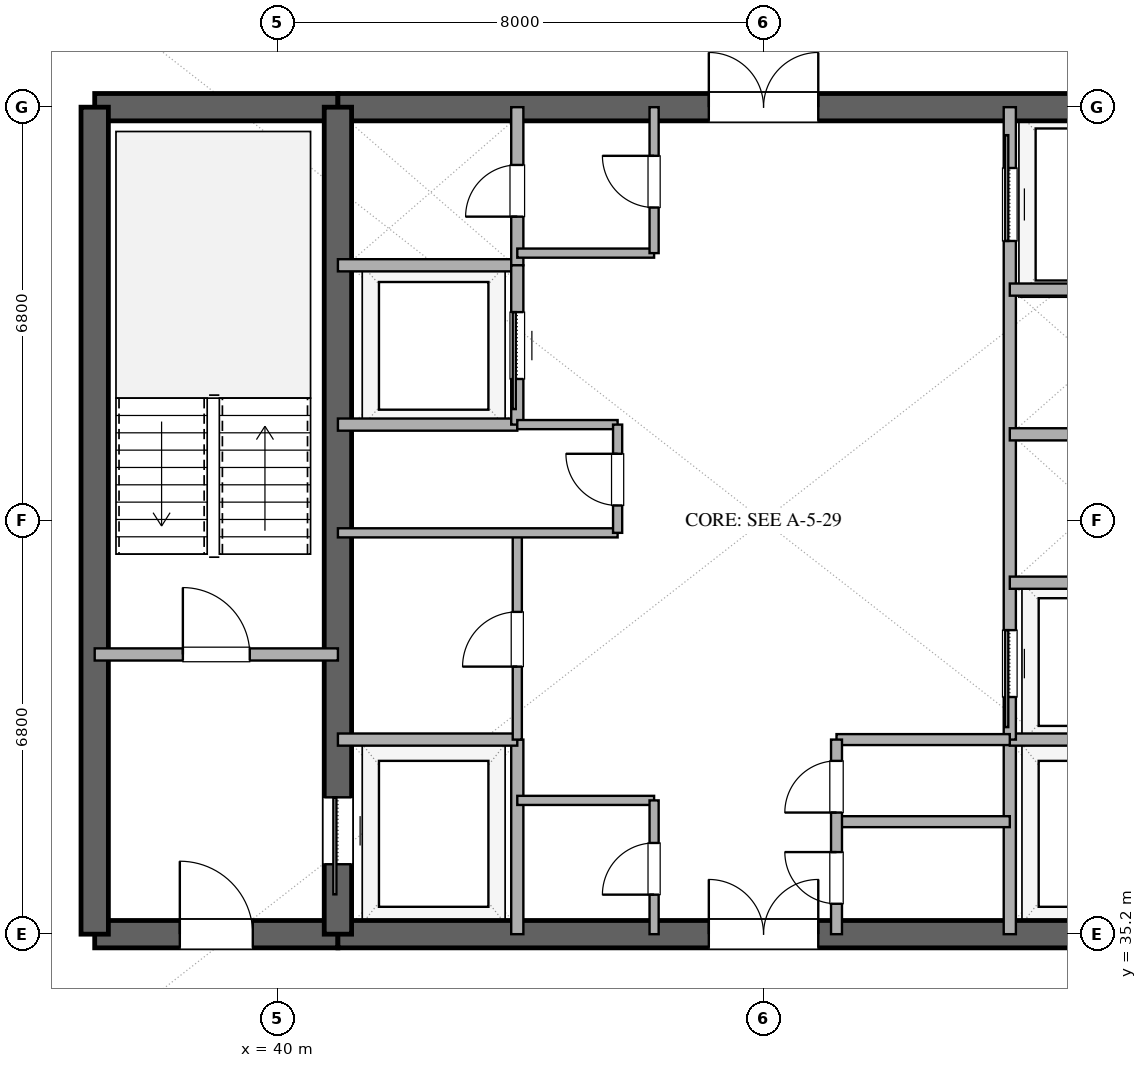
"""IFC4 building model, lengths in metres.
Left out: names, types, materials, properties, quantities, classifications, styles, units other than length and angle.
Written with IfcOpenShell. Run it as: python <this file> out.ifc"""

import sys

from ifc_helpers import new_model, si_unit, direction, frame, frame_2d, origin, place, context, subcontext, project, spatial, rectangle, extrude, element, fill, save


model = new_model("IFC4")
c1 = context("Model", 3, precision=1e-05, world=origin(), true_north=direction((0.0, 1.0)))
c2 = subcontext(c1, "Body", "Model", "MODEL_VIEW")
j1 = project(units=[si_unit("LENGTHUNIT", "METRE"), si_unit("PLANEANGLEUNIT", "RADIAN")], contexts=[c1])
p1 = place(None, origin())
s1 = spatial("IfcSite", under=j1, at=p1, CompositionType="ELEMENT")
p2 = place(p1, origin())
s2 = spatial("IfcBuilding", under=s1, at=p2, CompositionType="ELEMENT")
p3 = place(p2, frame((0.0, 0.0, 193.8)))
s3 = spatial("IfcBuildingStorey", under=s2, at=p3, CompositionType="ELEMENT", Elevation=193.8)
p4 = place(p3, frame((37.0, 35.2, 0.0), z_axis=(0.0, 0.0, 1.0), x_axis=(1.0, 0.0, 0.0)))
e1 = element("IfcWall", 1, at=p4, inside=s3, PredefinedType="SHEAR", context=c2, shape_type="SweptSolid", body=[
    extrude(rectangle(XDim=4.0, YDim=0.45, at=frame_2d((2.0, 0.0))), origin(), (0.0, 0.0, 1.0), 3.38),
])
p5 = place(p4, frame((1.4, 0.0, 0.0)))
e2 = element("IfcOpeningElement", 2, at=p5, cuts=e1, PredefinedType="OPENING", context=c2, shape_type="SweptSolid", body=[
    extrude(rectangle(XDim=1.2, YDim=2.15, at=frame_2d((0.6, 1.075))), frame((0.0, 0.235, 0.0), z_axis=(0.0, -1.0, 0.0), x_axis=(1.0, 0.0, 0.0)), (0.0, 0.0, 1.0), 0.47),
])
p6 = place(p3, frame((41.0, 35.2, 0.0), z_axis=(0.0, 0.0, 1.0), x_axis=(1.0, 0.0, 0.0)))
e3 = element("IfcWall", 3, at=p6, inside=s3, PredefinedType="SHEAR", context=c2, shape_type="SweptSolid", body=[
    extrude(rectangle(XDim=14.0, YDim=0.45, at=frame_2d((7.0, 0.0))), origin(), (0.0, 0.0, 1.0), 3.38),
])
p7 = place(p6, frame((6.1, 0.0, 0.0)))
e4 = element("IfcOpeningElement", 4, at=p7, cuts=e3, PredefinedType="OPENING", context=c2, shape_type="SweptSolid", body=[
    extrude(rectangle(XDim=1.8, YDim=2.25, at=frame_2d((0.9, 1.125))), frame((0.0, 0.235, 0.0), z_axis=(0.0, -1.0, 0.0), x_axis=(1.0, 0.0, 0.0)), (0.0, 0.0, 1.0), 0.47),
])
p8 = place(p3, frame((37.0, 48.8, 0.0), z_axis=(0.0, 0.0, 1.0), x_axis=(1.0, 0.0, 0.0)))
e5 = element("IfcWall", 5, at=p8, inside=s3, PredefinedType="SHEAR", context=c2, shape_type="SweptSolid", body=[
    extrude(rectangle(XDim=4.0, YDim=0.45, at=frame_2d((2.0, 0.0))), origin(), (0.0, 0.0, 1.0), 3.38),
])
p9 = place(p3, frame((41.0, 48.8, 0.0), z_axis=(0.0, 0.0, 1.0), x_axis=(1.0, 0.0, 0.0)))
e6 = element("IfcWall", 6, at=p9, inside=s3, PredefinedType="SHEAR", context=c2, shape_type="SweptSolid", body=[
    extrude(rectangle(XDim=14.0, YDim=0.45, at=frame_2d((7.0, 0.0))), origin(), (0.0, 0.0, 1.0), 3.38),
])
p10 = place(p9, frame((6.1, 0.0, 0.0)))
e7 = element("IfcOpeningElement", 7, at=p10, cuts=e6, PredefinedType="OPENING", context=c2, shape_type="SweptSolid", body=[
    extrude(rectangle(XDim=1.8, YDim=2.25, at=frame_2d((0.9, 1.125))), frame((0.0, 0.235, 0.0), z_axis=(0.0, -1.0, 0.0), x_axis=(1.0, 0.0, 0.0)), (0.0, 0.0, 1.0), 0.47),
])
p11 = place(p3, frame((37.0, 35.2, 0.0), z_axis=(0.0, 0.0, 1.0), x_axis=(0.0, 1.0, 0.0)))
e8 = element("IfcWall", 8, at=p11, inside=s3, PredefinedType="SHEAR", context=c2, shape_type="SweptSolid", body=[
    extrude(rectangle(XDim=13.6, YDim=0.45, at=frame_2d((6.8, 0.0))), origin(), (0.0, 0.0, 1.0), 3.38),
])
p12 = place(p3, frame((41.0, 35.2, 0.0), z_axis=(0.0, 0.0, 1.0), x_axis=(0.0, 1.0, 0.0)))
e9 = element("IfcWall", 9, at=p12, inside=s3, PredefinedType="SHEAR", context=c2, shape_type="SweptSolid", body=[
    extrude(rectangle(XDim=13.6, YDim=0.45, at=frame_2d((6.8, 0.0))), origin(), (0.0, 0.0, 1.0), 3.38),
])
p13 = place(p12, frame((1.15, 0.0, 0.0)))
e10 = element("IfcOpeningElement", 10, at=p13, cuts=e9, PredefinedType="OPENING", context=c2, shape_type="SweptSolid", body=[
    extrude(rectangle(XDim=1.1, YDim=2.2, at=frame_2d((0.55, 1.1))), frame((0.0, 0.235, 0.0), z_axis=(0.0, -1.0, 0.0), x_axis=(1.0, 0.0, 0.0)), (0.0, 0.0, 1.0), 0.47),
])
p14 = place(p3, frame((37.0, 39.8, 0.0), z_axis=(0.0, 0.0, 1.0), x_axis=(1.0, 0.0, 0.0)))
e11 = element("IfcWall", 11, at=p14, inside=s3, PredefinedType="SOLIDWALL", context=c2, shape_type="SweptSolid", body=[
    extrude(rectangle(XDim=4.0, YDim=0.2, at=frame_2d((2.0, 0.0))), origin(), (0.0, 0.0, 1.0), 2.74),
])
p15 = place(p14, frame((1.45, 0.0, 0.0)))
e12 = element("IfcOpeningElement", 12, at=p15, cuts=e11, PredefinedType="OPENING", context=c2, shape_type="SweptSolid", body=[
    extrude(rectangle(XDim=1.1, YDim=2.15, at=frame_2d((0.55, 1.075))), frame((0.0, 0.11, 0.0), z_axis=(0.0, -1.0, 0.0), x_axis=(1.0, 0.0, 0.0)), (0.0, 0.0, 1.0), 0.22),
])
p16 = place(p3, frame((43.95, 35.2, 0.0), z_axis=(0.0, 0.0, 1.0), x_axis=(0.0, 1.0, 0.0)))
e13 = element("IfcWall", 13, at=p16, inside=s3, PredefinedType="SOLIDWALL", context=c2, shape_type="SweptSolid", body=[
    extrude(rectangle(XDim=3.2, YDim=0.2, at=frame_2d((1.6, 0.0))), origin(), (0.0, 0.0, 1.0), 2.74),
])
p17 = place(p3, frame((41.0, 38.4, 0.0), z_axis=(0.0, 0.0, 1.0), x_axis=(1.0, 0.0, 0.0)))
e14 = element("IfcWall", 14, at=p17, inside=s3, PredefinedType="SOLIDWALL", context=c2, shape_type="SweptSolid", body=[
    extrude(rectangle(XDim=2.95, YDim=0.2, at=frame_2d((1.475, 0.0))), origin(), (0.0, 0.0, 1.0), 2.74),
])
p18 = place(p3, frame((52.05, 35.2, 0.0), z_axis=(0.0, 0.0, 1.0), x_axis=(0.0, 1.0, 0.0)))
e15 = element("IfcWall", 15, at=p18, inside=s3, PredefinedType="SOLIDWALL", context=c2, shape_type="SweptSolid", body=[
    extrude(rectangle(XDim=3.2, YDim=0.2, at=frame_2d((1.6, 0.0))), origin(), (0.0, 0.0, 1.0), 2.74),
])
for number, where, z_axis, x_axis in (
    (16, (52.05, 38.4, 0.0), (0.0, 0.0, 1.0), (1.0, 0.0, 0.0)),
    (17, (41.0, 46.2, 0.0), (0.0, 0.0, 1.0), (1.0, 0.0, 0.0)),
):
    element("IfcWall", number, at=place(p3, frame(where, z_axis=z_axis, x_axis=x_axis)), inside=s3, PredefinedType="SOLIDWALL", context=c2, shape_type="SweptSolid", body=[
        extrude(rectangle(XDim=2.95, YDim=0.2, at=frame_2d((1.475, 0.0))), origin(), (0.0, 0.0, 1.0), 2.74),
    ])
p19 = place(p3, frame((43.95, 46.2, 0.0), z_axis=(0.0, 0.0, 1.0), x_axis=(0.0, 1.0, 0.0)))
e18 = element("IfcWall", 18, at=p19, inside=s3, PredefinedType="SOLIDWALL", context=c2, shape_type="SweptSolid", body=[
    extrude(rectangle(XDim=2.6, YDim=0.2, at=frame_2d((1.3, 0.0))), origin(), (0.0, 0.0, 1.0), 2.74),
])
p20 = place(p19, frame((0.8, 0.0, 0.0)))
e19 = element("IfcOpeningElement", 19, at=p20, cuts=e18, PredefinedType="OPENING", context=c2, shape_type="SweptSolid", body=[
    extrude(rectangle(XDim=0.85, YDim=2.15, at=frame_2d((0.425, 1.075))), frame((0.0, 0.11, 0.0), z_axis=(0.0, -1.0, 0.0), x_axis=(1.0, 0.0, 0.0)), (0.0, 0.0, 1.0), 0.22),
])
p21 = place(p3, frame((41.0, 43.58, 0.0), z_axis=(0.0, 0.0, 1.0), x_axis=(1.0, 0.0, 0.0)))
e20 = element("IfcWall", 20, at=p21, inside=s3, PredefinedType="SOLIDWALL", context=c2, shape_type="SweptSolid", body=[
    extrude(rectangle(XDim=2.95, YDim=0.2, at=frame_2d((1.475, 0.0))), origin(), (0.0, 0.0, 1.0), 2.74),
])
p22 = place(p3, frame((43.95, 43.58, 0.0), z_axis=(0.0, 0.0, 1.0), x_axis=(0.0, 1.0, 0.0)))
e21 = element("IfcWall", 21, at=p22, inside=s3, PredefinedType="SOLIDWALL", context=c2, shape_type="SweptSolid", body=[
    extrude(rectangle(XDim=2.62, YDim=0.2, at=frame_2d((1.31, 0.0))), origin(), (0.0, 0.0, 1.0), 2.74),
])
p23 = place(p22, frame((0.75, 0.0, 0.0)))
e22 = element("IfcOpeningElement", 22, at=p23, cuts=e21, PredefinedType="OPENING", context=c2, shape_type="SweptSolid", body=[
    extrude(rectangle(XDim=1.1, YDim=2.2, at=frame_2d((0.55, 1.1))), frame((0.0, 0.11, 0.0), z_axis=(0.0, -1.0, 0.0), x_axis=(1.0, 0.0, 0.0)), (0.0, 0.0, 1.0), 0.22),
])
p24 = place(p3, frame((43.95, 38.4, 0.0), z_axis=(0.0, 0.0, 1.0), x_axis=(0.0, 1.0, 0.0)))
e23 = element("IfcWall", 23, at=p24, inside=s3, PredefinedType="PARTITIONING", context=c2, shape_type="SweptSolid", body=[
    extrude(rectangle(XDim=3.4, YDim=0.15, at=frame_2d((1.7, 0.0))), origin(), (0.0, 0.0, 1.0), 2.74),
])
p25 = place(p24, frame((1.2, 0.0, 0.0)))
e24 = element("IfcOpeningElement", 24, at=p25, cuts=e23, PredefinedType="OPENING", context=c2, shape_type="SweptSolid", body=[
    extrude(rectangle(XDim=0.9, YDim=2.15, at=frame_2d((0.45, 1.075))), frame((0.0, 0.085, 0.0), z_axis=(0.0, -1.0, 0.0), x_axis=(1.0, 0.0, 0.0)), (0.0, 0.0, 1.0), 0.17),
])
p26 = place(p3, frame((41.0, 41.8, 0.0), z_axis=(0.0, 0.0, 1.0), x_axis=(1.0, 0.0, 0.0)))
e25 = element("IfcWall", 25, at=p26, inside=s3, PredefinedType="PARTITIONING", context=c2, shape_type="SweptSolid", body=[
    extrude(rectangle(XDim=4.6, YDim=0.15, at=frame_2d((2.3, 0.0))), origin(), (0.0, 0.0, 1.0), 2.74),
])
p27 = place(p3, frame((43.95, 43.58, 0.0), z_axis=(0.0, 0.0, 1.0), x_axis=(1.0, 0.0, 0.0)))
e26 = element("IfcWall", 26, at=p27, inside=s3, PredefinedType="PARTITIONING", context=c2, shape_type="SweptSolid", body=[
    extrude(rectangle(XDim=1.65, YDim=0.15, at=frame_2d((0.825, 0.0))), origin(), (0.0, 0.0, 1.0), 2.74),
])
p28 = place(p3, frame((45.6, 41.8, 0.0), z_axis=(0.0, 0.0, 1.0), x_axis=(0.0, 1.0, 0.0)))
e27 = element("IfcWall", 27, at=p28, inside=s3, PredefinedType="PARTITIONING", context=c2, shape_type="SweptSolid", body=[
    extrude(rectangle(XDim=1.78, YDim=0.15, at=frame_2d((0.89, 0.0))), origin(), (0.0, 0.0, 1.0), 2.74),
])
p29 = place(p28, frame((0.45, 0.0, 0.0)))
e28 = element("IfcOpeningElement", 28, at=p29, cuts=e27, PredefinedType="OPENING", context=c2, shape_type="SweptSolid", body=[
    extrude(rectangle(XDim=0.85, YDim=2.15, at=frame_2d((0.425, 1.075))), frame((0.0, 0.085, 0.0), z_axis=(0.0, -1.0, 0.0), x_axis=(1.0, 0.0, 0.0)), (0.0, 0.0, 1.0), 0.17),
])
p30 = place(p3, frame((52.05, 38.4, 0.0), z_axis=(0.0, 0.0, 1.0), x_axis=(0.0, 1.0, 0.0)))
e29 = element("IfcWall", 29, at=p30, inside=s3, PredefinedType="SOLIDWALL", context=c2, shape_type="SweptSolid", body=[
    extrude(rectangle(XDim=10.4, YDim=0.2, at=frame_2d((5.2, 0.0))), origin(), (0.0, 0.0, 1.0), 2.74),
])
p31 = place(p30, frame((0.7, 0.0, 0.0)))
e30 = element("IfcOpeningElement", 30, at=p31, cuts=e29, PredefinedType="OPENING", context=c2, shape_type="SweptSolid", body=[
    extrude(rectangle(XDim=1.1, YDim=2.2, at=frame_2d((0.55, 1.1))), frame((0.0, 0.11, 0.0), z_axis=(0.0, -1.0, 0.0), x_axis=(1.0, 0.0, 0.0)), (0.0, 0.0, 1.0), 0.22),
])
p32 = place(p30, frame((8.2, 0.0, 0.0)))
e31 = element("IfcOpeningElement", 31, at=p32, cuts=e29, PredefinedType="OPENING", context=c2, shape_type="SweptSolid", body=[
    extrude(rectangle(XDim=1.2, YDim=2.2, at=frame_2d((0.6, 1.1))), frame((0.0, 0.11, 0.0), z_axis=(0.0, -1.0, 0.0), x_axis=(1.0, 0.0, 0.0)), (0.0, 0.0, 1.0), 0.22),
])
for number, where, z_axis, x_axis in (
    (32, (52.05, 40.98, 0.0), (0.0, 0.0, 1.0), (1.0, 0.0, 0.0)),
    (33, (52.05, 43.42, 0.0), (0.0, 0.0, 1.0), (1.0, 0.0, 0.0)),
    (34, (52.05, 45.8, 0.0), (0.0, 0.0, 1.0), (1.0, 0.0, 0.0)),
):
    element("IfcWall", number, at=place(p3, frame(where, z_axis=z_axis, x_axis=x_axis)), inside=s3, PredefinedType="SOLIDWALL", context=c2, shape_type="SweptSolid", body=[
        extrude(rectangle(XDim=2.95, YDim=0.2, at=frame_2d((1.475, 0.0))), origin(), (0.0, 0.0, 1.0), 2.74),
    ])
p33 = place(p3, frame((43.95, 37.4, 0.0), z_axis=(0.0, 0.0, 1.0), x_axis=(1.0, 0.0, 0.0)))
e35 = element("IfcWall", 35, at=p33, inside=s3, PredefinedType="PARTITIONING", context=c2, shape_type="SweptSolid", body=[
    extrude(rectangle(XDim=2.25, YDim=0.15, at=frame_2d((1.125, 0.0))), origin(), (0.0, 0.0, 1.0), 2.74),
])
p34 = place(p3, frame((46.2, 35.2, 0.0), z_axis=(0.0, 0.0, 1.0), x_axis=(0.0, 1.0, 0.0)))
e36 = element("IfcWall", 36, at=p34, inside=s3, PredefinedType="PARTITIONING", context=c2, shape_type="SweptSolid", body=[
    extrude(rectangle(XDim=2.2, YDim=0.15, at=frame_2d((1.1, 0.0))), origin(), (0.0, 0.0, 1.0), 2.74),
])
p35 = place(p34, frame((0.65, 0.0, 0.0)))
e37 = element("IfcOpeningElement", 37, at=p35, cuts=e36, PredefinedType="OPENING", context=c2, shape_type="SweptSolid", body=[
    extrude(rectangle(XDim=0.85, YDim=2.15, at=frame_2d((0.425, 1.075))), frame((0.0, 0.085, 0.0), z_axis=(0.0, -1.0, 0.0), x_axis=(1.0, 0.0, 0.0)), (0.0, 0.0, 1.0), 0.17),
])
p36 = place(p3, frame((43.95, 46.4, 0.0), z_axis=(0.0, 0.0, 1.0), x_axis=(1.0, 0.0, 0.0)))
e38 = element("IfcWall", 38, at=p36, inside=s3, PredefinedType="PARTITIONING", context=c2, shape_type="SweptSolid", body=[
    extrude(rectangle(XDim=2.25, YDim=0.15, at=frame_2d((1.125, 0.0))), origin(), (0.0, 0.0, 1.0), 2.74),
])
p37 = place(p3, frame((46.2, 46.4, 0.0), z_axis=(0.0, 0.0, 1.0), x_axis=(0.0, 1.0, 0.0)))
e39 = element("IfcWall", 39, at=p37, inside=s3, PredefinedType="PARTITIONING", context=c2, shape_type="SweptSolid", body=[
    extrude(rectangle(XDim=2.4, YDim=0.15, at=frame_2d((1.2, 0.0))), origin(), (0.0, 0.0, 1.0), 2.74),
])
p38 = place(p37, frame((0.75, 0.0, 0.0)))
e40 = element("IfcOpeningElement", 40, at=p38, cuts=e39, PredefinedType="OPENING", context=c2, shape_type="SweptSolid", body=[
    extrude(rectangle(XDim=0.85, YDim=2.15, at=frame_2d((0.425, 1.075))), frame((0.0, 0.085, 0.0), z_axis=(0.0, -1.0, 0.0), x_axis=(1.0, 0.0, 0.0)), (0.0, 0.0, 1.0), 0.17),
])
for number, where, z_axis, x_axis in (
    (41, (49.2, 37.05, 0.0), (0.0, 0.0, 1.0), (1.0, 0.0, 0.0)),
    (42, (49.2, 38.4, 0.0), (0.0, 0.0, 1.0), (1.0, 0.0, 0.0)),
):
    element("IfcWall", number, at=place(p3, frame(where, z_axis=z_axis, x_axis=x_axis)), inside=s3, PredefinedType="PLUMBINGWALL", context=c2, shape_type="SweptSolid", body=[
        extrude(rectangle(XDim=2.85, YDim=0.18, at=frame_2d((1.425, 0.0))), origin(), (0.0, 0.0, 1.0), 2.74),
    ])
p39 = place(p3, frame((49.2, 35.2, 0.0), z_axis=(0.0, 0.0, 1.0), x_axis=(0.0, 1.0, 0.0)))
e43 = element("IfcWall", 43, at=p39, inside=s3, PredefinedType="PLUMBINGWALL", context=c2, shape_type="SweptSolid", body=[
    extrude(rectangle(XDim=3.2, YDim=0.18, at=frame_2d((1.6, 0.0))), origin(), (0.0, 0.0, 1.0), 2.74),
])
p40 = place(p39, frame((0.5, 0.0, 0.0)))
e44 = element("IfcOpeningElement", 44, at=p40, cuts=e43, PredefinedType="OPENING", context=c2, shape_type="SweptSolid", body=[
    extrude(rectangle(XDim=0.85, YDim=2.1, at=frame_2d((0.425, 1.05))), frame((0.0, 0.1, 0.0), z_axis=(0.0, -1.0, 0.0), x_axis=(1.0, 0.0, 0.0)), (0.0, 0.0, 1.0), 0.2),
])
p41 = place(p39, frame((2.0, 0.0, 0.0)))
e45 = element("IfcOpeningElement", 45, at=p41, cuts=e43, PredefinedType="OPENING", context=c2, shape_type="SweptSolid", body=[
    extrude(rectangle(XDim=0.85, YDim=2.15, at=frame_2d((0.425, 1.075))), frame((0.0, 0.1, 0.0), z_axis=(0.0, -1.0, 0.0), x_axis=(1.0, 0.0, 0.0)), (0.0, 0.0, 1.0), 0.2),
])
p42 = place(p13, origin())
e46 = element("IfcDoor", 46, at=p42, inside=s3, OperationType="SLIDING_TO_LEFT", PredefinedType="DOOR", context=c2, shape_type="SweptSolid", body=[
    extrude(rectangle(XDim=1.1, YDim=2.2, at=frame_2d((0.55, 1.1))), frame((0.0, 0.025, 0.0), z_axis=(0.0, -1.0, 0.0), x_axis=(1.0, 0.0, 0.0)), (0.0, 0.0, 1.0), 0.05),
])
fill(e10, e46)
p43 = place(p5, origin())
e47 = element("IfcDoor", 47, at=p43, inside=s3, OperationType="SINGLE_SWING_LEFT", PredefinedType="DOOR", context=c2, shape_type="SweptSolid", body=[
    extrude(rectangle(XDim=1.2, YDim=2.15, at=frame_2d((0.6, 1.075))), frame((0.0, 0.025, 0.0), z_axis=(0.0, -1.0, 0.0), x_axis=(1.0, 0.0, 0.0)), (0.0, 0.0, 1.0), 0.05),
])
fill(e2, e47)
p44 = place(p7, origin())
e48 = element("IfcDoor", 48, at=p44, inside=s3, OperationType="DOUBLE_DOOR_SINGLE_SWING", PredefinedType="DOOR", context=c2, shape_type="SweptSolid", body=[
    extrude(rectangle(XDim=1.8, YDim=2.25, at=frame_2d((0.9, 1.125))), frame((0.0, 0.025, 0.0), z_axis=(0.0, -1.0, 0.0), x_axis=(1.0, 0.0, 0.0)), (0.0, 0.0, 1.0), 0.05),
])
fill(e4, e48)
p45 = place(p10, origin())
e49 = element("IfcDoor", 49, at=p45, inside=s3, OperationType="DOUBLE_DOOR_SINGLE_SWING", PredefinedType="DOOR", context=c2, shape_type="SweptSolid", body=[
    extrude(rectangle(XDim=1.8, YDim=2.25, at=frame_2d((0.9, 1.125))), frame((0.0, 0.025, 0.0), z_axis=(0.0, -1.0, 0.0), x_axis=(1.0, 0.0, 0.0)), (0.0, 0.0, 1.0), 0.05),
])
fill(e7, e49)
p46 = place(p15, origin())
e50 = element("IfcDoor", 50, at=p46, inside=s3, OperationType="SINGLE_SWING_LEFT", PredefinedType="DOOR", context=c2, shape_type="SweptSolid", body=[
    extrude(rectangle(XDim=1.1, YDim=2.15, at=frame_2d((0.55, 1.075))), frame((0.0, 0.025, 0.0), z_axis=(0.0, -1.0, 0.0), x_axis=(1.0, 0.0, 0.0)), (0.0, 0.0, 1.0), 0.05),
])
fill(e12, e50)
p47 = place(p20, origin())
e51 = element("IfcDoor", 51, at=p47, inside=s3, OperationType="SINGLE_SWING_LEFT", PredefinedType="DOOR", context=c2, shape_type="SweptSolid", body=[
    extrude(rectangle(XDim=0.85, YDim=2.15, at=frame_2d((0.425, 1.075))), frame((0.0, 0.025, 0.0), z_axis=(0.0, -1.0, 0.0), x_axis=(1.0, 0.0, 0.0)), (0.0, 0.0, 1.0), 0.05),
])
fill(e19, e51)
p48 = place(p23, origin())
e52 = element("IfcDoor", 52, at=p48, inside=s3, OperationType="SLIDING_TO_LEFT", PredefinedType="DOOR", context=c2, shape_type="SweptSolid", body=[
    extrude(rectangle(XDim=1.1, YDim=2.2, at=frame_2d((0.55, 1.1))), frame((0.0, 0.025, 0.0), z_axis=(0.0, -1.0, 0.0), x_axis=(1.0, 0.0, 0.0)), (0.0, 0.0, 1.0), 0.05),
])
fill(e22, e52)
p49 = place(p25, origin())
e53 = element("IfcDoor", 53, at=p49, inside=s3, OperationType="SINGLE_SWING_LEFT", PredefinedType="DOOR", context=c2, shape_type="SweptSolid", body=[
    extrude(rectangle(XDim=0.9, YDim=2.15, at=frame_2d((0.45, 1.075))), frame((0.0, 0.025, 0.0), z_axis=(0.0, -1.0, 0.0), x_axis=(1.0, 0.0, 0.0)), (0.0, 0.0, 1.0), 0.05),
])
fill(e24, e53)
p50 = place(p29, origin())
e54 = element("IfcDoor", 54, at=p50, inside=s3, OperationType="SINGLE_SWING_RIGHT", PredefinedType="DOOR", context=c2, shape_type="SweptSolid", body=[
    extrude(rectangle(XDim=0.85, YDim=2.15, at=frame_2d((0.425, 1.075))), frame((0.0, 0.025, 0.0), z_axis=(0.0, -1.0, 0.0), x_axis=(1.0, 0.0, 0.0)), (0.0, 0.0, 1.0), 0.05),
])
fill(e28, e54)
p51 = place(p31, origin())
e55 = element("IfcDoor", 55, at=p51, inside=s3, OperationType="SLIDING_TO_LEFT", PredefinedType="DOOR", context=c2, shape_type="SweptSolid", body=[
    extrude(rectangle(XDim=1.1, YDim=2.2, at=frame_2d((0.55, 1.1))), frame((0.0, 0.025, 0.0), z_axis=(0.0, -1.0, 0.0), x_axis=(1.0, 0.0, 0.0)), (0.0, 0.0, 1.0), 0.05),
])
fill(e30, e55)
p52 = place(p32, origin())
e56 = element("IfcDoor", 56, at=p52, inside=s3, OperationType="SLIDING_TO_RIGHT", PredefinedType="DOOR", context=c2, shape_type="SweptSolid", body=[
    extrude(rectangle(XDim=1.2, YDim=2.2, at=frame_2d((0.6, 1.1))), frame((0.0, 0.025, 0.0), z_axis=(0.0, -1.0, 0.0), x_axis=(1.0, 0.0, 0.0)), (0.0, 0.0, 1.0), 0.05),
])
fill(e31, e56)
p53 = place(p35, origin())
e57 = element("IfcDoor", 57, at=p53, inside=s3, OperationType="SINGLE_SWING_LEFT", PredefinedType="DOOR", context=c2, shape_type="SweptSolid", body=[
    extrude(rectangle(XDim=0.85, YDim=2.15, at=frame_2d((0.425, 1.075))), frame((0.0, 0.025, 0.0), z_axis=(0.0, -1.0, 0.0), x_axis=(1.0, 0.0, 0.0)), (0.0, 0.0, 1.0), 0.05),
])
fill(e37, e57)
p54 = place(p38, origin())
e58 = element("IfcDoor", 58, at=p54, inside=s3, OperationType="SINGLE_SWING_RIGHT", PredefinedType="DOOR", context=c2, shape_type="SweptSolid", body=[
    extrude(rectangle(XDim=0.85, YDim=2.15, at=frame_2d((0.425, 1.075))), frame((0.0, 0.025, 0.0), z_axis=(0.0, -1.0, 0.0), x_axis=(1.0, 0.0, 0.0)), (0.0, 0.0, 1.0), 0.05),
])
fill(e40, e58)
p55 = place(p40, origin())
e59 = element("IfcDoor", 59, at=p55, inside=s3, OperationType="SINGLE_SWING_RIGHT", PredefinedType="DOOR", context=c2, shape_type="SweptSolid", body=[
    extrude(rectangle(XDim=0.85, YDim=2.1, at=frame_2d((0.425, 1.05))), frame((0.0, 0.025, 0.0), z_axis=(0.0, -1.0, 0.0), x_axis=(1.0, 0.0, 0.0)), (0.0, 0.0, 1.0), 0.05),
])
fill(e44, e59)
p56 = place(p41, origin())
e60 = element("IfcDoor", 60, at=p56, inside=s3, OperationType="SINGLE_SWING_LEFT", PredefinedType="DOOR", context=c2, shape_type="SweptSolid", body=[
    extrude(rectangle(XDim=0.85, YDim=2.15, at=frame_2d((0.425, 1.075))), frame((0.0, 0.025, 0.0), z_axis=(0.0, -1.0, 0.0), x_axis=(1.0, 0.0, 0.0)), (0.0, 0.0, 1.0), 0.05),
])
fill(e45, e60)
save(model, sys.argv[1])
